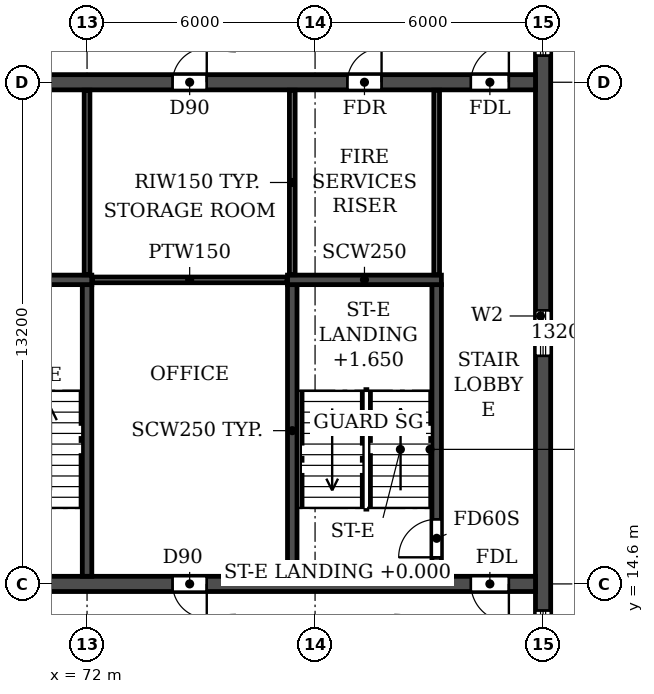
"""IFC4 building model, lengths in metres.
Left out: names, types, materials, properties, quantities, classifications, styles, units other than length and angle.
Written with IfcOpenShell. Run it as: python <this file> out.ifc"""

import sys

from ifc_helpers import new_model, si_unit, direction, frame, frame_2d, origin, place, context, subcontext, project, spatial, rectangle, extrude, element, fill, save


model = new_model("IFC4")
c1 = context("Model", 3, precision=1e-05, world=origin(), true_north=direction((0.0, 1.0)))
c2 = subcontext(c1, "Body", "Model", "MODEL_VIEW")
j1 = project(units=[si_unit("LENGTHUNIT", "METRE"), si_unit("PLANEANGLEUNIT", "RADIAN")], contexts=[c1])
p1 = place(None, origin())
s1 = spatial("IfcSite", under=j1, at=p1, CompositionType="ELEMENT")
p2 = place(p1, origin())
s2 = spatial("IfcBuilding", under=s1, at=p2, CompositionType="ELEMENT")
p3 = place(p2, frame((0.0, 0.0, 211.5)))
s3 = spatial("IfcBuildingStorey", under=s2, at=p3, CompositionType="ELEMENT", Elevation=211.5)
p4 = place(p3, frame((84.0, 4.683, 0.0), z_axis=(0.0, 0.0, 1.0), x_axis=(0.0, 1.0, 0.0)))
e1 = element("IfcWall", 1, at=p4, inside=s3, PredefinedType="SHEAR", context=c2, shape_type="SweptSolid", body=[
    extrude(rectangle(XDim=31.834, YDim=0.4, at=frame_2d((15.917, 0.0))), origin(), (0.0, 0.0, 1.0), 2.95),
])
p5 = place(p4, frame((23.817, 0.0, 0.9)))
e2 = element("IfcOpeningElement", 2, at=p5, cuts=e1, PredefinedType="OPENING", context=c2, shape_type="SweptSolid", body=[
    extrude(rectangle(XDim=1.2, YDim=1.5, at=frame_2d((0.6, 0.75))), frame((0.0, 0.21, 0.0), z_axis=(0.0, -1.0, 0.0), x_axis=(1.0, 0.0, 0.0)), (0.0, 0.0, 1.0), 0.42),
])
p6 = place(p4, frame((8.017, 0.0, 0.9)))
e3 = element("IfcOpeningElement", 3, at=p6, cuts=e1, PredefinedType="OPENING", context=c2, shape_type="SweptSolid", body=[
    extrude(rectangle(XDim=1.2, YDim=1.5, at=frame_2d((0.6, 0.75))), frame((0.0, 0.21, 0.0), z_axis=(0.0, -1.0, 0.0), x_axis=(1.0, 0.0, 0.0)), (0.0, 0.0, 1.0), 0.42),
])
p7 = place(p4, frame((27.694, 0.0, 0.6)))
e4 = element("IfcOpeningElement", 4, at=p7, cuts=e1, PredefinedType="OPENING", context=c2, shape_type="SweptSolid", body=[
    extrude(rectangle(XDim=2.2, YDim=1.8, at=frame_2d((1.1, 0.9))), frame((0.0, 0.21, 0.0), z_axis=(0.0, -1.0, 0.0), x_axis=(1.0, 0.0, 0.0)), (0.0, 0.0, 1.0), 0.42),
])
p8 = place(p4, frame((15.917, 0.0, 0.9)))
e5 = element("IfcOpeningElement", 5, at=p8, cuts=e1, PredefinedType="OPENING", context=c2, shape_type="SweptSolid", body=[
    extrude(rectangle(XDim=1.2, YDim=1.5, at=frame_2d((0.6, 0.75))), frame((0.0, 0.21, 0.0), z_axis=(0.0, -1.0, 0.0), x_axis=(1.0, 0.0, 0.0)), (0.0, 0.0, 1.0), 0.42),
])
p9 = place(p3, frame((18.2, 14.6, 0.0), z_axis=(0.0, 0.0, 1.0), x_axis=(1.0, 0.0, 0.0)))
e6 = element("IfcWall", 6, at=p9, inside=s3, PredefinedType="SOLIDWALL", context=c2, shape_type="SweptSolid", body=[
    extrude(rectangle(XDim=65.6, YDim=0.4, at=frame_2d((32.8, 0.0))), origin(), (0.0, 0.0, 1.0), 2.95),
])
p10 = place(p9, frame((0.7, 0.0, 0.0)))
e7 = element("IfcOpeningElement", 7, at=p10, cuts=e6, PredefinedType="OPENING", context=c2, shape_type="SweptSolid", body=[
    extrude(rectangle(XDim=1.0, YDim=2.1, at=frame_2d((0.5, 1.05))), frame((0.0, 0.21, 0.0), z_axis=(0.0, -1.0, 0.0), x_axis=(1.0, 0.0, 0.0)), (0.0, 0.0, 1.0), 0.42),
])
p11 = place(p9, frame((8.65, 0.0, 0.0)))
e8 = element("IfcOpeningElement", 8, at=p11, cuts=e6, PredefinedType="OPENING", context=c2, shape_type="SweptSolid", body=[
    extrude(rectangle(XDim=0.9, YDim=2.1, at=frame_2d((0.45, 1.05))), frame((0.0, 0.21, 0.0), z_axis=(0.0, -1.0, 0.0), x_axis=(1.0, 0.0, 0.0)), (0.0, 0.0, 1.0), 0.42),
])
p12 = place(p9, frame((13.2, 0.0, 0.0)))
e9 = element("IfcOpeningElement", 9, at=p12, cuts=e6, PredefinedType="OPENING", context=c2, shape_type="SweptSolid", body=[
    extrude(rectangle(XDim=1.0, YDim=2.1, at=frame_2d((0.5, 1.05))), frame((0.0, 0.21, 0.0), z_axis=(0.0, -1.0, 0.0), x_axis=(1.0, 0.0, 0.0)), (0.0, 0.0, 1.0), 0.42),
])
p13 = place(p9, frame((24.5, 0.0, 0.0)))
e10 = element("IfcOpeningElement", 10, at=p13, cuts=e6, PredefinedType="OPENING", context=c2, shape_type="SweptSolid", body=[
    extrude(rectangle(XDim=1.0, YDim=2.1, at=frame_2d((0.5, 1.05))), frame((0.0, 0.21, 0.0), z_axis=(0.0, -1.0, 0.0), x_axis=(1.0, 0.0, 0.0)), (0.0, 0.0, 1.0), 0.42),
])
p14 = place(p9, frame((28.15, 0.0, 0.0)))
e11 = element("IfcOpeningElement", 11, at=p14, cuts=e6, PredefinedType="OPENING", context=c2, shape_type="SweptSolid", body=[
    extrude(rectangle(XDim=1.5, YDim=2.1, at=frame_2d((0.75, 1.05))), frame((0.0, 0.21, 0.0), z_axis=(0.0, -1.0, 0.0), x_axis=(1.0, 0.0, 0.0)), (0.0, 0.0, 1.0), 0.42),
])
p15 = place(p9, frame((32.3, 0.0, 0.0)))
e12 = element("IfcOpeningElement", 12, at=p15, cuts=e6, PredefinedType="OPENING", context=c2, shape_type="SweptSolid", body=[
    extrude(rectangle(XDim=1.0, YDim=2.1, at=frame_2d((0.5, 1.05))), frame((0.0, 0.21, 0.0), z_axis=(0.0, -1.0, 0.0), x_axis=(1.0, 0.0, 0.0)), (0.0, 0.0, 1.0), 0.42),
])
p16 = place(p9, frame((37.5, 0.0, 0.0)))
e13 = element("IfcOpeningElement", 13, at=p16, cuts=e6, PredefinedType="OPENING", context=c2, shape_type="SweptSolid", body=[
    extrude(rectangle(XDim=1.0, YDim=2.1, at=frame_2d((0.5, 1.05))), frame((0.0, 0.21, 0.0), z_axis=(0.0, -1.0, 0.0), x_axis=(1.0, 0.0, 0.0)), (0.0, 0.0, 1.0), 0.42),
])
p17 = place(p9, frame((51.4, 0.0, 0.0)))
e14 = element("IfcOpeningElement", 14, at=p17, cuts=e6, PredefinedType="OPENING", context=c2, shape_type="SweptSolid", body=[
    extrude(rectangle(XDim=1.0, YDim=2.1, at=frame_2d((0.5, 1.05))), frame((0.0, 0.21, 0.0), z_axis=(0.0, -1.0, 0.0), x_axis=(1.0, 0.0, 0.0)), (0.0, 0.0, 1.0), 0.42),
])
p18 = place(p9, frame((56.05, 0.0, 0.0)))
e15 = element("IfcOpeningElement", 15, at=p18, cuts=e6, PredefinedType="OPENING", context=c2, shape_type="SweptSolid", body=[
    extrude(rectangle(XDim=0.9, YDim=2.1, at=frame_2d((0.45, 1.05))), frame((0.0, 0.21, 0.0), z_axis=(0.0, -1.0, 0.0), x_axis=(1.0, 0.0, 0.0)), (0.0, 0.0, 1.0), 0.42),
])
p19 = place(p9, frame((63.9, 0.0, 0.0)))
e16 = element("IfcOpeningElement", 16, at=p19, cuts=e6, PredefinedType="OPENING", context=c2, shape_type="SweptSolid", body=[
    extrude(rectangle(XDim=1.0, YDim=2.1, at=frame_2d((0.5, 1.05))), frame((0.0, 0.21, 0.0), z_axis=(0.0, -1.0, 0.0), x_axis=(1.0, 0.0, 0.0)), (0.0, 0.0, 1.0), 0.42),
])
p20 = place(p3, frame((18.2, 27.8, 0.0), z_axis=(0.0, 0.0, 1.0), x_axis=(1.0, 0.0, 0.0)))
e17 = element("IfcWall", 17, at=p20, inside=s3, PredefinedType="SOLIDWALL", context=c2, shape_type="SweptSolid", body=[
    extrude(rectangle(XDim=65.6, YDim=0.4, at=frame_2d((32.8, 0.0))), origin(), (0.0, 0.0, 1.0), 2.95),
])
p21 = place(p20, frame((0.7, 0.0, 0.0)))
e18 = element("IfcOpeningElement", 18, at=p21, cuts=e17, PredefinedType="OPENING", context=c2, shape_type="SweptSolid", body=[
    extrude(rectangle(XDim=1.0, YDim=2.1, at=frame_2d((0.5, 1.05))), frame((0.0, 0.21, 0.0), z_axis=(0.0, -1.0, 0.0), x_axis=(1.0, 0.0, 0.0)), (0.0, 0.0, 1.0), 0.42),
])
p22 = place(p20, frame((4.05, 0.0, 0.0)))
e19 = element("IfcOpeningElement", 19, at=p22, cuts=e17, PredefinedType="OPENING", context=c2, shape_type="SweptSolid", body=[
    extrude(rectangle(XDim=0.9, YDim=2.1, at=frame_2d((0.45, 1.05))), frame((0.0, 0.21, 0.0), z_axis=(0.0, -1.0, 0.0), x_axis=(1.0, 0.0, 0.0)), (0.0, 0.0, 1.0), 0.42),
])
p23 = place(p20, frame((8.65, 0.0, 0.0)))
e20 = element("IfcOpeningElement", 20, at=p23, cuts=e17, PredefinedType="OPENING", context=c2, shape_type="SweptSolid", body=[
    extrude(rectangle(XDim=0.9, YDim=2.1, at=frame_2d((0.45, 1.05))), frame((0.0, 0.21, 0.0), z_axis=(0.0, -1.0, 0.0), x_axis=(1.0, 0.0, 0.0)), (0.0, 0.0, 1.0), 0.42),
])
p24 = place(p20, frame((13.25, 0.0, 0.0)))
e21 = element("IfcOpeningElement", 21, at=p24, cuts=e17, PredefinedType="OPENING", context=c2, shape_type="SweptSolid", body=[
    extrude(rectangle(XDim=0.9, YDim=2.1, at=frame_2d((0.45, 1.05))), frame((0.0, 0.21, 0.0), z_axis=(0.0, -1.0, 0.0), x_axis=(1.0, 0.0, 0.0)), (0.0, 0.0, 1.0), 0.42),
])
p25 = place(p20, frame((16.4, 0.0, 0.0)))
e22 = element("IfcOpeningElement", 22, at=p25, cuts=e17, PredefinedType="OPENING", context=c2, shape_type="SweptSolid", body=[
    extrude(rectangle(XDim=1.0, YDim=2.1, at=frame_2d((0.5, 1.05))), frame((0.0, 0.21, 0.0), z_axis=(0.0, -1.0, 0.0), x_axis=(1.0, 0.0, 0.0)), (0.0, 0.0, 1.0), 0.42),
])
p26 = place(p20, frame((21.6, 0.0, 0.0)))
e23 = element("IfcOpeningElement", 23, at=p26, cuts=e17, PredefinedType="OPENING", context=c2, shape_type="SweptSolid", body=[
    extrude(rectangle(XDim=1.0, YDim=2.1, at=frame_2d((0.5, 1.05))), frame((0.0, 0.21, 0.0), z_axis=(0.0, -1.0, 0.0), x_axis=(1.0, 0.0, 0.0)), (0.0, 0.0, 1.0), 0.42),
])
p27 = place(p20, frame((29.4, 0.0, 0.0)))
e24 = element("IfcOpeningElement", 24, at=p27, cuts=e17, PredefinedType="OPENING", context=c2, shape_type="SweptSolid", body=[
    extrude(rectangle(XDim=1.0, YDim=2.1, at=frame_2d((0.5, 1.05))), frame((0.0, 0.21, 0.0), z_axis=(0.0, -1.0, 0.0), x_axis=(1.0, 0.0, 0.0)), (0.0, 0.0, 1.0), 0.42),
])
p28 = place(p20, frame((32.3, 0.0, 0.0)))
e25 = element("IfcOpeningElement", 25, at=p28, cuts=e17, PredefinedType="OPENING", context=c2, shape_type="SweptSolid", body=[
    extrude(rectangle(XDim=1.0, YDim=2.1, at=frame_2d((0.5, 1.05))), frame((0.0, 0.21, 0.0), z_axis=(0.0, -1.0, 0.0), x_axis=(1.0, 0.0, 0.0)), (0.0, 0.0, 1.0), 0.42),
])
p29 = place(p20, frame((36.25, 0.0, 0.0)))
e26 = element("IfcOpeningElement", 26, at=p29, cuts=e17, PredefinedType="OPENING", context=c2, shape_type="SweptSolid", body=[
    extrude(rectangle(XDim=1.5, YDim=2.1, at=frame_2d((0.75, 1.05))), frame((0.0, 0.21, 0.0), z_axis=(0.0, -1.0, 0.0), x_axis=(1.0, 0.0, 0.0)), (0.0, 0.0, 1.0), 0.42),
])
p30 = place(p20, frame((41.7, 0.0, 0.0)))
e27 = element("IfcOpeningElement", 27, at=p30, cuts=e17, PredefinedType="OPENING", context=c2, shape_type="SweptSolid", body=[
    extrude(rectangle(XDim=1.0, YDim=2.1, at=frame_2d((0.5, 1.05))), frame((0.0, 0.21, 0.0), z_axis=(0.0, -1.0, 0.0), x_axis=(1.0, 0.0, 0.0)), (0.0, 0.0, 1.0), 0.42),
])
p31 = place(p20, frame((45.6, 0.0, 0.0)))
e28 = element("IfcOpeningElement", 28, at=p31, cuts=e17, PredefinedType="OPENING", context=c2, shape_type="SweptSolid", body=[
    extrude(rectangle(XDim=1.0, YDim=2.1, at=frame_2d((0.5, 1.05))), frame((0.0, 0.21, 0.0), z_axis=(0.0, -1.0, 0.0), x_axis=(1.0, 0.0, 0.0)), (0.0, 0.0, 1.0), 0.42),
])
p32 = place(p20, frame((48.2, 0.0, 0.0)))
e29 = element("IfcOpeningElement", 29, at=p32, cuts=e17, PredefinedType="OPENING", context=c2, shape_type="SweptSolid", body=[
    extrude(rectangle(XDim=1.0, YDim=2.1, at=frame_2d((0.5, 1.05))), frame((0.0, 0.21, 0.0), z_axis=(0.0, -1.0, 0.0), x_axis=(1.0, 0.0, 0.0)), (0.0, 0.0, 1.0), 0.42),
])
p33 = place(p20, frame((51.45, 0.0, 0.0)))
e30 = element("IfcOpeningElement", 30, at=p33, cuts=e17, PredefinedType="OPENING", context=c2, shape_type="SweptSolid", body=[
    extrude(rectangle(XDim=0.9, YDim=2.1, at=frame_2d((0.45, 1.05))), frame((0.0, 0.21, 0.0), z_axis=(0.0, -1.0, 0.0), x_axis=(1.0, 0.0, 0.0)), (0.0, 0.0, 1.0), 0.42),
])
p34 = place(p20, frame((56.05, 0.0, 0.0)))
e31 = element("IfcOpeningElement", 31, at=p34, cuts=e17, PredefinedType="OPENING", context=c2, shape_type="SweptSolid", body=[
    extrude(rectangle(XDim=0.9, YDim=2.1, at=frame_2d((0.45, 1.05))), frame((0.0, 0.21, 0.0), z_axis=(0.0, -1.0, 0.0), x_axis=(1.0, 0.0, 0.0)), (0.0, 0.0, 1.0), 0.42),
])
p35 = place(p20, frame((60.65, 0.0, 0.0)))
e32 = element("IfcOpeningElement", 32, at=p35, cuts=e17, PredefinedType="OPENING", context=c2, shape_type="SweptSolid", body=[
    extrude(rectangle(XDim=0.9, YDim=2.1, at=frame_2d((0.45, 1.05))), frame((0.0, 0.21, 0.0), z_axis=(0.0, -1.0, 0.0), x_axis=(1.0, 0.0, 0.0)), (0.0, 0.0, 1.0), 0.42),
])
p36 = place(p20, frame((63.9, 0.0, 0.0)))
e33 = element("IfcOpeningElement", 33, at=p36, cuts=e17, PredefinedType="OPENING", context=c2, shape_type="SweptSolid", body=[
    extrude(rectangle(XDim=1.0, YDim=2.1, at=frame_2d((0.5, 1.05))), frame((0.0, 0.21, 0.0), z_axis=(0.0, -1.0, 0.0), x_axis=(1.0, 0.0, 0.0)), (0.0, 0.0, 1.0), 0.42),
])
p37 = place(p3, frame((72.0, 14.8, 0.0), z_axis=(0.0, 0.0, 1.0), x_axis=(0.0, 1.0, 0.0)))
e34 = element("IfcWall", 34, at=p37, inside=s3, PredefinedType="SOLIDWALL", context=c2, shape_type="SweptSolid", body=[
    extrude(rectangle(XDim=7.675, YDim=0.25, at=frame_2d((3.837, 0.0))), origin(), (0.0, 0.0, 1.0), 2.95),
])
p38 = place(p3, frame((68.075, 22.6, 0.0), z_axis=(0.0, 0.0, 1.0), x_axis=(1.0, 0.0, 0.0)))
e35 = element("IfcWall", 35, at=p38, inside=s3, PredefinedType="SOLIDWALL", context=c2, shape_type="SweptSolid", body=[
    extrude(rectangle(XDim=4.05, YDim=0.25, at=frame_2d((2.025, 0.0))), origin(), (0.0, 0.0, 1.0), 2.95),
])
p39 = place(p3, frame((77.4, 14.8, 0.0), z_axis=(0.0, 0.0, 1.0), x_axis=(0.0, 1.0, 0.0)))
e36 = element("IfcWall", 36, at=p39, inside=s3, PredefinedType="SOLIDWALL", context=c2, shape_type="SweptSolid", body=[
    extrude(rectangle(XDim=7.675, YDim=0.25, at=frame_2d((3.837, 0.0))), origin(), (0.0, 0.0, 1.0), 2.95),
])
p40 = place(p3, frame((81.2, 14.8, 0.0), z_axis=(0.0, 0.0, 1.0), x_axis=(0.0, 1.0, 0.0)))
e37 = element("IfcWall", 37, at=p40, inside=s3, PredefinedType="SOLIDWALL", context=c2, shape_type="SweptSolid", body=[
    extrude(rectangle(XDim=7.675, YDim=0.25, at=frame_2d((3.837, 0.0))), origin(), (0.0, 0.0, 1.0), 2.95),
])
p41 = place(p40, frame((0.5, 0.0, 0.0)))
e38 = element("IfcOpeningElement", 38, at=p41, cuts=e37, PredefinedType="OPENING", context=c2, shape_type="SweptSolid", body=[
    extrude(rectangle(XDim=1.0, YDim=2.1, at=frame_2d((0.5, 1.05))), frame((0.0, 0.135, 0.0), z_axis=(0.0, -1.0, 0.0), x_axis=(1.0, 0.0, 0.0)), (0.0, 0.0, 1.0), 0.27),
])
p42 = place(p3, frame((77.275, 22.6, 0.0), z_axis=(0.0, 0.0, 1.0), x_axis=(1.0, 0.0, 0.0)))
e39 = element("IfcWall", 39, at=p42, inside=s3, PredefinedType="SOLIDWALL", context=c2, shape_type="SweptSolid", body=[
    extrude(rectangle(XDim=4.05, YDim=0.25, at=frame_2d((2.025, 0.0))), origin(), (0.0, 0.0, 1.0), 2.95),
])
p43 = place(p3, frame((72.135, 22.6, 0.0), z_axis=(0.0, 0.0, 1.0), x_axis=(1.0, 0.0, 0.0)))
e40 = element("IfcWall", 40, at=p43, inside=s3, PredefinedType="PARTITIONING", context=c2, shape_type="SweptSolid", body=[
    extrude(rectangle(XDim=5.13, YDim=0.15, at=frame_2d((2.565, 0.0))), origin(), (0.0, 0.0, 1.0), 2.95),
])
for number, where, z_axis, x_axis in (
    (41, (72.0, 22.735, 0.0), (0.0, 0.0, 1.0), (0.0, 1.0, 0.0)),
    (42, (77.4, 22.735, 0.0), (0.0, 0.0, 1.0), (0.0, 1.0, 0.0)),
    (43, (81.2, 22.735, 0.0), (0.0, 0.0, 1.0), (0.0, 1.0, 0.0)),
):
    element("IfcWall", number, at=place(p3, frame(where, z_axis=z_axis, x_axis=x_axis)), inside=s3, PredefinedType="PARTITIONING", context=c2, shape_type="SweptSolid", body=[
        extrude(rectangle(XDim=4.855, YDim=0.15, at=frame_2d((2.427, 0.0))), origin(), (0.0, 0.0, 1.0), 2.95),
    ])
p44 = place(p5, origin())
e44 = element("IfcWindow", 44, at=p44, inside=s3, PartitioningType="SINGLE_PANEL", PredefinedType="WINDOW", context=c2, shape_type="SweptSolid", body=[
    extrude(rectangle(XDim=1.2, YDim=1.5, at=frame_2d((0.6, 0.75))), frame((0.0, 0.03, 0.0), z_axis=(0.0, -1.0, 0.0), x_axis=(1.0, 0.0, 0.0)), (0.0, 0.0, 1.0), 0.06),
])
fill(e2, e44)
p45 = place(p6, origin())
e45 = element("IfcWindow", 45, at=p45, inside=s3, PartitioningType="SINGLE_PANEL", PredefinedType="WINDOW", context=c2, shape_type="SweptSolid", body=[
    extrude(rectangle(XDim=1.2, YDim=1.5, at=frame_2d((0.6, 0.75))), frame((0.0, 0.03, 0.0), z_axis=(0.0, -1.0, 0.0), x_axis=(1.0, 0.0, 0.0)), (0.0, 0.0, 1.0), 0.06),
])
fill(e3, e45)
p46 = place(p8, origin())
e46 = element("IfcWindow", 46, at=p46, inside=s3, PartitioningType="SINGLE_PANEL", PredefinedType="WINDOW", context=c2, shape_type="SweptSolid", body=[
    extrude(rectangle(XDim=1.2, YDim=1.5, at=frame_2d((0.6, 0.75))), frame((0.0, 0.03, 0.0), z_axis=(0.0, -1.0, 0.0), x_axis=(1.0, 0.0, 0.0)), (0.0, 0.0, 1.0), 0.06),
])
fill(e5, e46)
p47 = place(p34, origin())
e47 = element("IfcDoor", 47, at=p47, inside=s3, OperationType="SINGLE_SWING_RIGHT", PredefinedType="DOOR", context=c2, shape_type="SweptSolid", body=[
    extrude(rectangle(XDim=0.9, YDim=2.1, at=frame_2d((0.45, 1.05))), frame((0.0, 0.025, 0.0), z_axis=(0.0, -1.0, 0.0), x_axis=(1.0, 0.0, 0.0)), (0.0, 0.0, 1.0), 0.05),
])
fill(e31, e47)
p48 = place(p35, origin())
e48 = element("IfcDoor", 48, at=p48, inside=s3, OperationType="SINGLE_SWING_RIGHT", PredefinedType="DOOR", context=c2, shape_type="SweptSolid", body=[
    extrude(rectangle(XDim=0.9, YDim=2.1, at=frame_2d((0.45, 1.05))), frame((0.0, 0.025, 0.0), z_axis=(0.0, -1.0, 0.0), x_axis=(1.0, 0.0, 0.0)), (0.0, 0.0, 1.0), 0.05),
])
fill(e32, e48)
p49 = place(p36, origin())
e49 = element("IfcDoor", 49, at=p49, inside=s3, OperationType="SINGLE_SWING_RIGHT", PredefinedType="DOOR", context=c2, shape_type="SweptSolid", body=[
    extrude(rectangle(XDim=1.0, YDim=2.1, at=frame_2d((0.5, 1.05))), frame((0.0, 0.025, 0.0), z_axis=(0.0, -1.0, 0.0), x_axis=(1.0, 0.0, 0.0)), (0.0, 0.0, 1.0), 0.05),
])
fill(e33, e49)
p50 = place(p18, frame((0.9, 0.0, 0.0), z_axis=(0.0, 0.0, 1.0), x_axis=(-1.0, 0.0, 0.0)))
e50 = element("IfcDoor", 50, at=p50, inside=s3, OperationType="SINGLE_SWING_LEFT", PredefinedType="DOOR", context=c2, shape_type="SweptSolid", body=[
    extrude(rectangle(XDim=0.9, YDim=2.1, at=frame_2d((0.45, 1.05))), frame((0.0, 0.025, 0.0), z_axis=(0.0, -1.0, 0.0), x_axis=(1.0, 0.0, 0.0)), (0.0, 0.0, 1.0), 0.05),
])
fill(e15, e50)
p51 = place(p19, frame((1.0, 0.0, 0.0), z_axis=(0.0, 0.0, 1.0), x_axis=(-1.0, 0.0, 0.0)))
e51 = element("IfcDoor", 51, at=p51, inside=s3, OperationType="SINGLE_SWING_LEFT", PredefinedType="DOOR", context=c2, shape_type="SweptSolid", body=[
    extrude(rectangle(XDim=1.0, YDim=2.1, at=frame_2d((0.5, 1.05))), frame((0.0, 0.025, 0.0), z_axis=(0.0, -1.0, 0.0), x_axis=(1.0, 0.0, 0.0)), (0.0, 0.0, 1.0), 0.05),
])
fill(e16, e51)
p52 = place(p41, origin())
e52 = element("IfcDoor", 52, at=p52, inside=s3, OperationType="SINGLE_SWING_LEFT", PredefinedType="DOOR", context=c2, shape_type="SweptSolid", body=[
    extrude(rectangle(XDim=1.0, YDim=2.1, at=frame_2d((0.5, 1.05))), frame((0.0, 0.025, 0.0), z_axis=(0.0, -1.0, 0.0), x_axis=(1.0, 0.0, 0.0)), (0.0, 0.0, 1.0), 0.05),
])
fill(e38, e52)
save(model, sys.argv[1])
